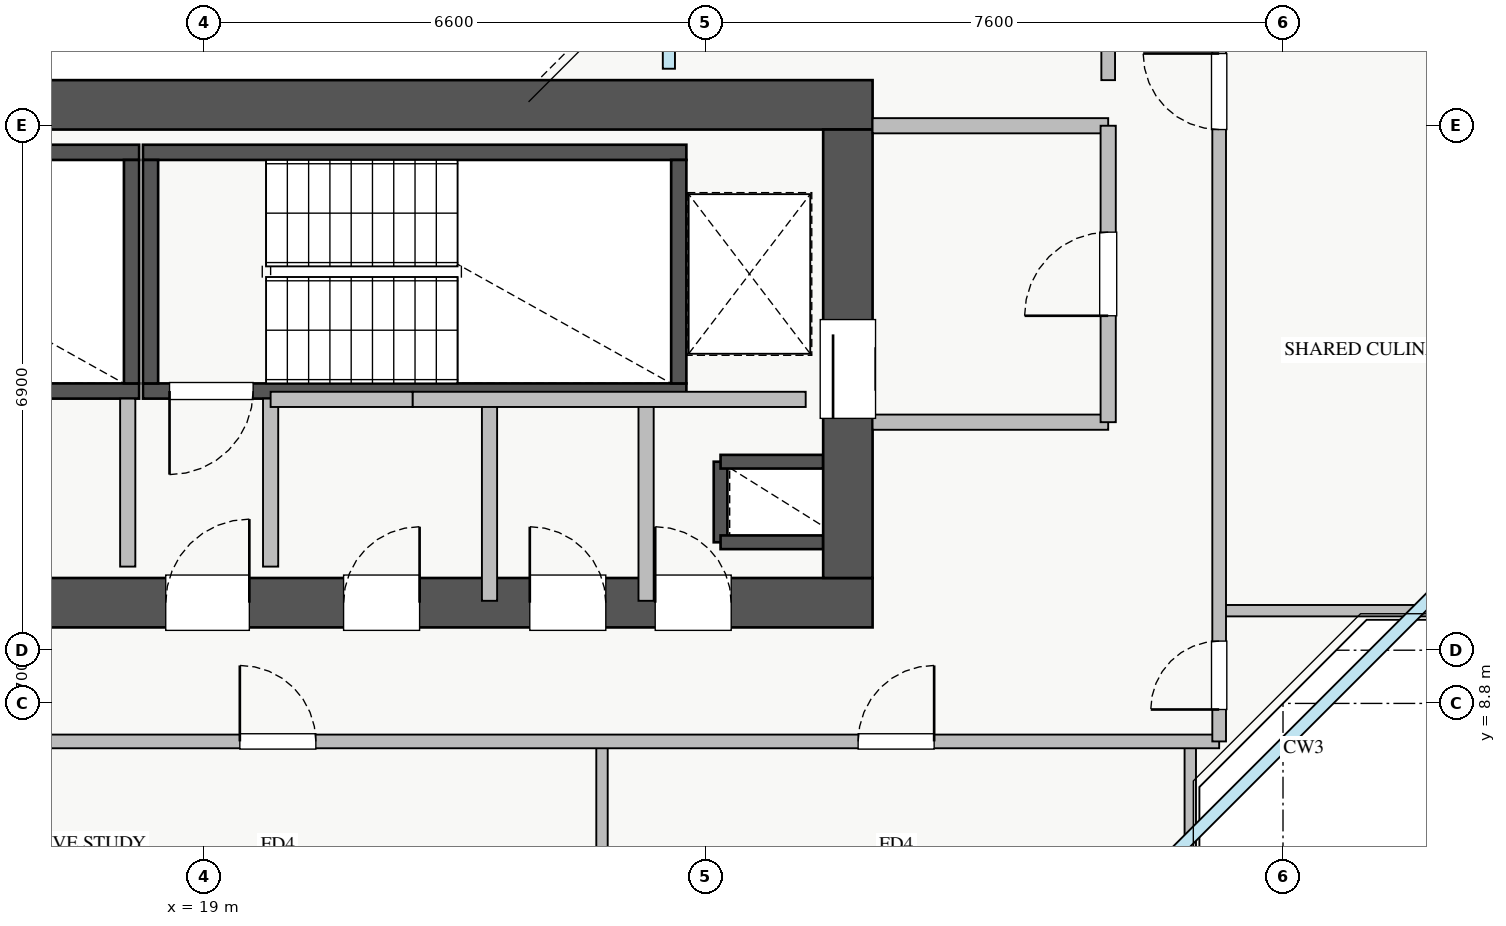
"""IFC4 building model, lengths in metres.
Left out: names, types, materials, properties, quantities, classifications, styles, units other than length and angle.
Written with IfcOpenShell. Run it as: python <this file> out.ifc"""

import sys

from ifc_helpers import new_model, si_unit, direction, frame, frame_2d, origin, place, context, subcontext, project, spatial, rectangle, extrude, source, transform, mapped, element, fill, save


model = new_model("IFC4")
c1 = context("Model", 3, precision=1e-05, world=origin(), true_north=direction((0.0, 1.0)))
c2 = subcontext(c1, "Body", "Model", "MODEL_VIEW")
j1 = project(units=[si_unit("LENGTHUNIT", "METRE"), si_unit("PLANEANGLEUNIT", "RADIAN")], contexts=[c1])
p1 = place(None, origin())
s1 = spatial("IfcSite", under=j1, at=p1, CompositionType="ELEMENT")
p2 = place(p1, origin())
s2 = spatial("IfcBuilding", under=s1, at=p2, CompositionType="ELEMENT")
p3 = place(p2, frame((0.0, 0.0, 150.25)))
s3 = spatial("IfcBuildingStorey", under=s2, at=p3, CompositionType="ELEMENT", Elevation=150.25)
p4 = place(p3, frame((25.8, 10.92, 0.0), z_axis=(0.0, 0.0, 1.0), x_axis=(0.0, 1.0, 0.0)))
e1 = element("IfcWall", 1, at=p4, inside=s3, PredefinedType="SHEAR", context=c2, shape_type="SweptSolid", body=[
    extrude(rectangle(XDim=1.06, YDim=0.18, at=frame_2d((0.53, 0.0))), origin(), (0.0, 0.0, 1.0), 3.07),
])
for number, where, z_axis, x_axis in (
    (2, (25.8, 11.98, 0.0), (0.0, 0.0, 1.0), (1.0, 0.0, 0.0)),
    (3, (25.8, 10.92, 0.0), (0.0, 0.0, 1.0), (1.0, 0.0, 0.0)),
):
    element("IfcWall", number, at=place(p3, frame(where, z_axis=z_axis, x_axis=x_axis)), inside=s3, PredefinedType="SHEAR", context=c2, shape_type="SweptSolid", body=[
        extrude(rectangle(XDim=1.35, YDim=0.18, at=frame_2d((0.675, 0.0))), origin(), (0.0, 0.0, 1.0), 3.07),
    ])
p5 = place(p3, frame((10.85, 12.91, 0.0), z_axis=(0.0, 0.0, 1.0), x_axis=(1.0, 0.0, 0.0)))
e4 = element("IfcWall", 4, at=p5, inside=s3, PredefinedType="SHEAR", context=c2, shape_type="SweptSolid", body=[
    extrude(rectangle(XDim=7.3, YDim=0.2, at=frame_2d((3.65, 0.0))), origin(), (0.0, 0.0, 1.0), 3.25),
])
p6 = place(p5, frame((0.35, 0.0, 0.0)))
e5 = element("IfcOpeningElement", 5, at=p6, cuts=e4, PredefinedType="OPENING", context=c2, shape_type="SweptSolid", body=[
    extrude(rectangle(XDim=1.1, YDim=2.05, at=frame_2d((0.55, 1.025))), frame((0.0, 0.11, 0.0), z_axis=(0.0, -1.0, 0.0), x_axis=(1.0, 0.0, 0.0)), (0.0, 0.0, 1.0), 0.22),
])
p7 = place(p3, frame((10.85, 16.05, 0.0), z_axis=(0.0, 0.0, 1.0), x_axis=(1.0, 0.0, 0.0)))
e6 = element("IfcWall", 6, at=p7, inside=s3, PredefinedType="SHEAR", context=c2, shape_type="SweptSolid", body=[
    extrude(rectangle(XDim=7.3, YDim=0.2, at=frame_2d((3.65, 0.0))), origin(), (0.0, 0.0, 1.0), 3.25),
])
p8 = place(p3, frame((18.05, 13.01, 0.0), z_axis=(0.0, 0.0, 1.0), x_axis=(0.0, 1.0, 0.0)))
e7 = element("IfcWall", 7, at=p8, inside=s3, PredefinedType="SHEAR", context=c2, shape_type="SweptSolid", body=[
    extrude(rectangle(XDim=2.94, YDim=0.2, at=frame_2d((1.47, 0.0))), origin(), (0.0, 0.0, 1.0), 3.25),
])
p9 = place(p3, frame((18.2, 12.91, 0.0), z_axis=(0.0, 0.0, 1.0), x_axis=(1.0, 0.0, 0.0)))
e8 = element("IfcWall", 8, at=p9, inside=s3, PredefinedType="SHEAR", context=c2, shape_type="SweptSolid", body=[
    extrude(rectangle(XDim=7.15, YDim=0.2, at=frame_2d((3.575, 0.0))), origin(), (0.0, 0.0, 1.0), 3.25),
])
p10 = place(p9, frame((0.35, 0.0, 0.0)))
e9 = element("IfcOpeningElement", 9, at=p10, cuts=e8, PredefinedType="OPENING", context=c2, shape_type="SweptSolid", body=[
    extrude(rectangle(XDim=1.1, YDim=2.05, at=frame_2d((0.55, 1.025))), frame((0.0, 0.11, 0.0), z_axis=(0.0, -1.0, 0.0), x_axis=(1.0, 0.0, 0.0)), (0.0, 0.0, 1.0), 0.22),
])
p11 = place(p3, frame((18.2, 16.05, 0.0), z_axis=(0.0, 0.0, 1.0), x_axis=(1.0, 0.0, 0.0)))
e10 = element("IfcWall", 10, at=p11, inside=s3, PredefinedType="SHEAR", context=c2, shape_type="SweptSolid", body=[
    extrude(rectangle(XDim=7.15, YDim=0.2, at=frame_2d((3.575, 0.0))), origin(), (0.0, 0.0, 1.0), 3.25),
])
for number, where, z_axis, x_axis in (
    (11, (18.3, 13.01, 0.0), (0.0, 0.0, 1.0), (0.0, 1.0, 0.0)),
    (12, (25.25, 13.01, 0.0), (0.0, 0.0, 1.0), (0.0, 1.0, 0.0)),
):
    element("IfcWall", number, at=place(p3, frame(where, z_axis=z_axis, x_axis=x_axis)), inside=s3, PredefinedType="SHEAR", context=c2, shape_type="SweptSolid", body=[
        extrude(rectangle(XDim=2.94, YDim=0.2, at=frame_2d((1.47, 0.0))), origin(), (0.0, 0.0, 1.0), 3.25),
    ])
p12 = place(p3, frame((10.2, 10.125, 0.0), z_axis=(0.0, 0.0, 1.0), x_axis=(1.0, 0.0, 0.0)))
e13 = element("IfcWall", 13, at=p12, inside=s3, PredefinedType="SHEAR", context=c2, shape_type="SweptSolid", body=[
    extrude(rectangle(XDim=17.6, YDim=0.65, at=frame_2d((8.8, 0.0))), origin(), (0.0, 0.0, 1.0), 3.25),
])
p13 = place(p12, frame((1.15, 0.0, 0.0)))
e14 = element("IfcOpeningElement", 14, at=p13, cuts=e13, PredefinedType="OPENING", context=c2, shape_type="SweptSolid", body=[
    extrude(rectangle(XDim=1.1, YDim=2.05, at=frame_2d((0.55, 1.025))), frame((0.0, 0.335, 0.0), z_axis=(0.0, -1.0, 0.0), x_axis=(1.0, 0.0, 0.0)), (0.0, 0.0, 1.0), 0.67),
])
p14 = place(p12, frame((8.3, 0.0, 0.0)))
e15 = element("IfcOpeningElement", 15, at=p14, cuts=e13, PredefinedType="OPENING", context=c2, shape_type="SweptSolid", body=[
    extrude(rectangle(XDim=1.1, YDim=2.05, at=frame_2d((0.55, 1.025))), frame((0.0, 0.335, 0.0), z_axis=(0.0, -1.0, 0.0), x_axis=(1.0, 0.0, 0.0)), (0.0, 0.0, 1.0), 0.67),
])
p15 = place(p12, frame((4.9, 0.0, 0.0)))
e16 = element("IfcOpeningElement", 16, at=p15, cuts=e13, PredefinedType="OPENING", context=c2, shape_type="SweptSolid", body=[
    extrude(rectangle(XDim=1.1, YDim=2.05, at=frame_2d((0.55, 1.025))), frame((0.0, 0.335, 0.0), z_axis=(0.0, -1.0, 0.0), x_axis=(1.0, 0.0, 0.0)), (0.0, 0.0, 1.0), 0.67),
])
p16 = place(p12, frame((14.74, 0.0, 0.0)))
e17 = element("IfcOpeningElement", 17, at=p16, cuts=e13, PredefinedType="OPENING", context=c2, shape_type="SweptSolid", body=[
    extrude(rectangle(XDim=1.0, YDim=2.05, at=frame_2d((0.5, 1.025))), frame((0.0, 0.335, 0.0), z_axis=(0.0, -1.0, 0.0), x_axis=(1.0, 0.0, 0.0)), (0.0, 0.0, 1.0), 0.67),
])
p17 = place(p12, frame((10.64, 0.0, 0.0)))
e18 = element("IfcOpeningElement", 18, at=p17, cuts=e13, PredefinedType="OPENING", context=c2, shape_type="SweptSolid", body=[
    extrude(rectangle(XDim=1.0, YDim=2.05, at=frame_2d((0.5, 1.025))), frame((0.0, 0.335, 0.0), z_axis=(0.0, -1.0, 0.0), x_axis=(1.0, 0.0, 0.0)), (0.0, 0.0, 1.0), 0.67),
])
p18 = place(p12, frame((13.09, 0.0, 0.0)))
e19 = element("IfcOpeningElement", 19, at=p18, cuts=e13, PredefinedType="OPENING", context=c2, shape_type="SweptSolid", body=[
    extrude(rectangle(XDim=1.0, YDim=2.05, at=frame_2d((0.5, 1.025))), frame((0.0, 0.335, 0.0), z_axis=(0.0, -1.0, 0.0), x_axis=(1.0, 0.0, 0.0)), (0.0, 0.0, 1.0), 0.67),
])
p19 = place(p3, frame((10.2, 16.675, 0.0), z_axis=(0.0, 0.0, 1.0), x_axis=(1.0, 0.0, 0.0)))
e20 = element("IfcWall", 20, at=p19, inside=s3, PredefinedType="SHEAR", context=c2, shape_type="SweptSolid", body=[
    extrude(rectangle(XDim=17.6, YDim=0.65, at=frame_2d((8.8, 0.0))), origin(), (0.0, 0.0, 1.0), 3.25),
])
p20 = place(p3, frame((27.475, 10.45, 0.0), z_axis=(0.0, 0.0, 1.0), x_axis=(0.0, 1.0, 0.0)))
e21 = element("IfcWall", 21, at=p20, inside=s3, PredefinedType="SHEAR", context=c2, shape_type="SweptSolid", body=[
    extrude(rectangle(XDim=5.9, YDim=0.65, at=frame_2d((2.95, 0.0))), origin(), (0.0, 0.0, 1.0), 3.25),
])
p21 = place(p20, frame((2.1, 0.0, 0.0)))
e22 = element("IfcOpeningElement", 22, at=p21, cuts=e21, PredefinedType="OPENING", context=c2, shape_type="SweptSolid", body=[
    extrude(rectangle(XDim=1.3, YDim=2.05, at=frame_2d((0.65, 1.025))), frame((0.0, 0.335, 0.0), z_axis=(0.0, -1.0, 0.0), x_axis=(1.0, 0.0, 0.0)), (0.0, 0.0, 1.0), 0.67),
])
for number, where, z_axis, x_axis in (
    (23, (27.8, 16.4, 0.0), (0.0, 0.0, 1.0), (1.0, 0.0, 0.0)),
    (24, (27.8, 12.5, 0.0), (0.0, 0.0, 1.0), (1.0, 0.0, 0.0)),
):
    element("IfcWall", number, at=place(p3, frame(where, z_axis=z_axis, x_axis=x_axis)), inside=s3, PredefinedType="PARTITIONING", context=c2, shape_type="SweptSolid", body=[
        extrude(rectangle(XDim=3.1, YDim=0.2, at=frame_2d((1.55, 0.0))), origin(), (0.0, 0.0, 1.0), 3.07),
    ])
p22 = place(p3, frame((30.9, 12.5, 0.0), z_axis=(0.0, 0.0, 1.0), x_axis=(0.0, 1.0, 0.0)))
e25 = element("IfcWall", 25, at=p22, inside=s3, PredefinedType="PARTITIONING", context=c2, shape_type="SweptSolid", body=[
    extrude(rectangle(XDim=3.9, YDim=0.2, at=frame_2d((1.95, 0.0))), origin(), (0.0, 0.0, 1.0), 3.07),
])
p23 = place(p22, frame((1.4, 0.0, 0.0)))
e26 = element("IfcOpeningElement", 26, at=p23, cuts=e25, PredefinedType="OPENING", context=c2, shape_type="SweptSolid", body=[
    extrude(rectangle(XDim=1.1, YDim=2.05, at=frame_2d((0.55, 1.025))), frame((0.0, 0.11, 0.0), z_axis=(0.0, -1.0, 0.0), x_axis=(1.0, 0.0, 0.0)), (0.0, 0.0, 1.0), 0.22),
])
for number, where, z_axis, x_axis in (
    (27, (18.0, 10.6, 0.0), (0.0, 0.0, 1.0), (0.0, 1.0, 0.0)),
    (28, (19.88, 10.6, 0.0), (0.0, 0.0, 1.0), (0.0, 1.0, 0.0)),
):
    element("IfcWall", number, at=place(p3, frame(where, z_axis=z_axis, x_axis=x_axis)), inside=s3, PredefinedType="PARTITIONING", context=c2, shape_type="SweptSolid", body=[
        extrude(rectangle(XDim=2.21, YDim=0.2, at=frame_2d((1.105, 0.0))), origin(), (0.0, 0.0, 1.0), 3.07),
    ])
p24 = place(p3, frame((24.82, 10.15, 0.0), z_axis=(0.0, 0.0, 1.0), x_axis=(0.0, 1.0, 0.0)))
e29 = element("IfcWall", 29, at=p24, inside=s3, PredefinedType="PARTITIONING", context=c2, shape_type="SweptSolid", body=[
    extrude(rectangle(XDim=2.65, YDim=0.2, at=frame_2d((1.325, 0.0))), origin(), (0.0, 0.0, 1.0), 3.07),
])
p25 = place(p3, frame((19.88, 12.8, 0.0), z_axis=(0.0, 0.0, 1.0), x_axis=(1.0, 0.0, 0.0)))
e30 = element("IfcWall", 30, at=p25, inside=s3, PredefinedType="PARTITIONING", context=c2, shape_type="SweptSolid", body=[
    extrude(rectangle(XDim=1.87, YDim=0.2, at=frame_2d((0.935, 0.0))), origin(), (0.0, 0.0, 1.0), 3.07),
])
p26 = place(p3, frame((22.76, 10.15, 0.0), z_axis=(0.0, 0.0, 1.0), x_axis=(0.0, 1.0, 0.0)))
e31 = element("IfcWall", 31, at=p26, inside=s3, PredefinedType="PARTITIONING", context=c2, shape_type="SweptSolid", body=[
    extrude(rectangle(XDim=2.65, YDim=0.2, at=frame_2d((1.325, 0.0))), origin(), (0.0, 0.0, 1.0), 3.07),
])
p27 = place(p3, frame((21.75, 12.8, 0.0), z_axis=(0.0, 0.0, 1.0), x_axis=(1.0, 0.0, 0.0)))
e32 = element("IfcWall", 32, at=p27, inside=s3, PredefinedType="PARTITIONING", context=c2, shape_type="SweptSolid", body=[
    extrude(rectangle(XDim=5.17, YDim=0.2, at=frame_2d((2.585, 0.0))), origin(), (0.0, 0.0, 1.0), 3.07),
])
for number, where, z_axis, x_axis in (
    (33, (24.24, 5.35, 0.0), (0.0, 0.0, 1.0), (0.0, 1.0, 0.0)),
    (34, (31.98, 5.35, 0.0), (0.0, 0.0, 1.0), (0.0, 1.0, 0.0)),
):
    element("IfcWall", number, at=place(p3, frame(where, z_axis=z_axis, x_axis=x_axis)), inside=s3, PredefinedType="PARTITIONING", context=c2, shape_type="SweptSolid", body=[
        extrude(rectangle(XDim=2.95, YDim=0.15, at=frame_2d((1.475, 0.0))), origin(), (0.0, 0.0, 1.0), 3.07),
    ])
p28 = place(p3, frame((8.75, 8.3, 0.0), z_axis=(0.0, 0.0, 1.0), x_axis=(1.0, 0.0, 0.0)))
e35 = element("IfcWall", 35, at=p28, inside=s3, PredefinedType="PARTITIONING", context=c2, shape_type="SweptSolid", body=[
    extrude(rectangle(XDim=23.61, YDim=0.18, at=frame_2d((11.805, 0.0))), origin(), (0.0, 0.0, 1.0), 3.07),
])
p29 = place(p28, frame((2.98, 0.0, 0.0)))
e36 = element("IfcOpeningElement", 36, at=p29, cuts=e35, PredefinedType="OPENING", context=c2, shape_type="SweptSolid", body=[
    extrude(rectangle(XDim=1.0, YDim=2.05, at=frame_2d((0.5, 1.025))), frame((0.0, 0.1, 0.0), z_axis=(0.0, -1.0, 0.0), x_axis=(1.0, 0.0, 0.0)), (0.0, 0.0, 1.0), 0.2),
])
p30 = place(p28, frame((10.725, 0.0, 0.0)))
e37 = element("IfcOpeningElement", 37, at=p30, cuts=e35, PredefinedType="OPENING", context=c2, shape_type="SweptSolid", body=[
    extrude(rectangle(XDim=1.0, YDim=2.05, at=frame_2d((0.5, 1.025))), frame((0.0, 0.1, 0.0), z_axis=(0.0, -1.0, 0.0), x_axis=(1.0, 0.0, 0.0)), (0.0, 0.0, 1.0), 0.2),
])
p31 = place(p28, frame((18.86, 0.0, 0.0)))
e38 = element("IfcOpeningElement", 38, at=p31, cuts=e35, PredefinedType="OPENING", context=c2, shape_type="SweptSolid", body=[
    extrude(rectangle(XDim=1.0, YDim=2.05, at=frame_2d((0.5, 1.025))), frame((0.0, 0.1, 0.0), z_axis=(0.0, -1.0, 0.0), x_axis=(1.0, 0.0, 0.0)), (0.0, 0.0, 1.0), 0.2),
])
p32 = place(p3, frame((32.36, 10.02, 0.0), z_axis=(0.0, 0.0, 1.0), x_axis=(1.0, 0.0, 0.0)))
e39 = element("IfcWall", 39, at=p32, inside=s3, PredefinedType="PARTITIONING", context=c2, shape_type="SweptSolid", body=[
    extrude(rectangle(XDim=4.29, YDim=0.15, at=frame_2d((2.145, 0.0))), origin(), (0.0, 0.0, 1.0), 3.07),
])
p33 = place(p3, frame((32.36, 8.3, 0.0), z_axis=(0.0, 0.0, 1.0), x_axis=(0.0, 1.0, 0.0)))
e40 = element("IfcWall", 40, at=p33, inside=s3, PredefinedType="PARTITIONING", context=c2, shape_type="SweptSolid", body=[
    extrude(rectangle(XDim=29.4, YDim=0.18, at=frame_2d((14.7, 0.0))), origin(), (0.0, 0.0, 1.0), 3.07),
])
p34 = place(p33, frame((28.08, 0.0, 0.0)))
e41 = element("IfcOpeningElement", 41, at=p34, cuts=e40, PredefinedType="OPENING", context=c2, shape_type="SweptSolid", body=[
    extrude(rectangle(XDim=0.9, YDim=2.05, at=frame_2d((0.45, 1.025))), frame((0.0, 0.1, 0.0), z_axis=(0.0, -1.0, 0.0), x_axis=(1.0, 0.0, 0.0)), (0.0, 0.0, 1.0), 0.2),
])
p35 = place(p33, frame((0.42, 0.0, 0.0)))
e42 = element("IfcOpeningElement", 42, at=p35, cuts=e40, PredefinedType="OPENING", context=c2, shape_type="SweptSolid", body=[
    extrude(rectangle(XDim=0.9, YDim=2.05, at=frame_2d((0.45, 1.025))), frame((0.0, 0.1, 0.0), z_axis=(0.0, -1.0, 0.0), x_axis=(1.0, 0.0, 0.0)), (0.0, 0.0, 1.0), 0.2),
])
p36 = place(p33, frame((8.05, 0.0, 0.0)))
e43 = element("IfcOpeningElement", 43, at=p36, cuts=e40, PredefinedType="OPENING", context=c2, shape_type="SweptSolid", body=[
    extrude(rectangle(XDim=1.0, YDim=2.05, at=frame_2d((0.5, 1.025))), frame((0.0, 0.1, 0.0), z_axis=(0.0, -1.0, 0.0), x_axis=(1.0, 0.0, 0.0)), (0.0, 0.0, 1.0), 0.2),
])
p37 = place(p33, frame((18.01, 0.0, 0.0)))
e44 = element("IfcOpeningElement", 44, at=p37, cuts=e40, PredefinedType="OPENING", context=c2, shape_type="SweptSolid", body=[
    extrude(rectangle(XDim=1.0, YDim=2.05, at=frame_2d((0.5, 1.025))), frame((0.0, 0.1, 0.0), z_axis=(0.0, -1.0, 0.0), x_axis=(1.0, 0.0, 0.0)), (0.0, 0.0, 1.0), 0.2),
])
p38 = place(p3, frame((30.9, 17.0, 0.0), z_axis=(0.0, 0.0, 1.0), x_axis=(0.0, 1.0, 0.0)))
e45 = element("IfcWall", 45, at=p38, inside=s3, PredefinedType="PARTITIONING", context=c2, shape_type="SweptSolid", body=[
    extrude(rectangle(XDim=12.0, YDim=0.18, at=frame_2d((6.0, 0.0))), origin(), (0.0, 0.0, 1.0), 3.07),
])
p39 = place(p38, frame((2.36, 0.0, 0.0)))
e46 = element("IfcOpeningElement", 46, at=p39, cuts=e45, PredefinedType="OPENING", context=c2, shape_type="SweptSolid", body=[
    extrude(rectangle(XDim=1.0, YDim=2.05, at=frame_2d((0.5, 1.025))), frame((0.0, 0.1, 0.0), z_axis=(0.0, -1.0, 0.0), x_axis=(1.0, 0.0, 0.0)), (0.0, 0.0, 1.0), 0.2),
])
m1 = source(origin(), c2, "Body", "SweptSolid", [
    extrude(rectangle(XDim=1.3, YDim=2.05, at=frame_2d((0.65, 1.025))), frame((0.0, 0.025, 0.0), z_axis=(0.0, -1.0, 0.0), x_axis=(1.0, 0.0, 0.0)), (0.0, 0.0, 1.0), 0.05),
])
p40 = place(p21, origin())
e47 = element("IfcDoor", 47, at=p40, inside=s3, OperationType="SLIDING_TO_RIGHT", PredefinedType="DOOR", context=c2, shape_type="MappedRepresentation", body=[
    mapped(m1, transform((0.0, 0.0, 0.0), x_axis=(1.0, 0.0, 0.0), y_axis=(0.0, 1.0, 0.0), z_axis=(0.0, 0.0, 1.0), scale=1.0)),
])
fill(e22, e47)
m2 = source(origin(), c2, "Body", "SweptSolid", [
    extrude(rectangle(XDim=1.1, YDim=2.05, at=frame_2d((0.55, 1.025))), frame((0.0, 0.025, 0.0), z_axis=(0.0, -1.0, 0.0), x_axis=(1.0, 0.0, 0.0)), (0.0, 0.0, 1.0), 0.05),
])
p41 = place(p14, origin())
e48 = element("IfcDoor", 48, at=p41, inside=s3, OperationType="SINGLE_SWING_RIGHT", PredefinedType="DOOR", context=c2, shape_type="MappedRepresentation", body=[
    mapped(m2, transform((0.0, 0.0, 0.0), x_axis=(1.0, 0.0, 0.0), y_axis=(0.0, 1.0, 0.0), z_axis=(0.0, 0.0, 1.0), scale=1.0)),
])
fill(e15, e48)
p42 = place(p10, frame((1.1, 0.0, 0.0), z_axis=(0.0, 0.0, 1.0), x_axis=(-1.0, 0.0, 0.0)))
e49 = element("IfcDoor", 49, at=p42, inside=s3, OperationType="SINGLE_SWING_LEFT", PredefinedType="DOOR", context=c2, shape_type="MappedRepresentation", body=[
    mapped(m2, transform((0.0, 0.0, 0.0), x_axis=(1.0, 0.0, 0.0), y_axis=(0.0, 1.0, 0.0), z_axis=(0.0, 0.0, 1.0), scale=1.0)),
])
fill(e9, e49)
m3 = source(origin(), c2, "Body", "SweptSolid", [
    extrude(rectangle(XDim=1.0, YDim=2.05, at=frame_2d((0.5, 1.025))), frame((0.0, 0.025, 0.0), z_axis=(0.0, -1.0, 0.0), x_axis=(1.0, 0.0, 0.0)), (0.0, 0.0, 1.0), 0.05),
])
p43 = place(p16, origin())
e50 = element("IfcDoor", 50, at=p43, inside=s3, OperationType="SINGLE_SWING_LEFT", PredefinedType="DOOR", context=c2, shape_type="MappedRepresentation", body=[
    mapped(m3, transform((0.0, 0.0, 0.0), x_axis=(1.0, 0.0, 0.0), y_axis=(0.0, 1.0, 0.0), z_axis=(0.0, 0.0, 1.0), scale=1.0)),
])
fill(e17, e50)
p44 = place(p17, origin())
e51 = element("IfcDoor", 51, at=p44, inside=s3, OperationType="SINGLE_SWING_RIGHT", PredefinedType="DOOR", context=c2, shape_type="MappedRepresentation", body=[
    mapped(m3, transform((0.0, 0.0, 0.0), x_axis=(1.0, 0.0, 0.0), y_axis=(0.0, 1.0, 0.0), z_axis=(0.0, 0.0, 1.0), scale=1.0)),
])
fill(e18, e51)
p45 = place(p18, origin())
e52 = element("IfcDoor", 52, at=p45, inside=s3, OperationType="SINGLE_SWING_LEFT", PredefinedType="DOOR", context=c2, shape_type="MappedRepresentation", body=[
    mapped(m3, transform((0.0, 0.0, 0.0), x_axis=(1.0, 0.0, 0.0), y_axis=(0.0, 1.0, 0.0), z_axis=(0.0, 0.0, 1.0), scale=1.0)),
])
fill(e19, e52)
p46 = place(p23, origin())
e53 = element("IfcDoor", 53, at=p46, inside=s3, OperationType="SINGLE_SWING_LEFT", PredefinedType="DOOR", context=c2, shape_type="MappedRepresentation", body=[
    mapped(m2, transform((0.0, 0.0, 0.0), x_axis=(1.0, 0.0, 0.0), y_axis=(0.0, 1.0, 0.0), z_axis=(0.0, 0.0, 1.0), scale=1.0)),
])
fill(e26, e53)
p47 = place(p30, origin())
e54 = element("IfcDoor", 54, at=p47, inside=s3, OperationType="SINGLE_SWING_LEFT", PredefinedType="DOOR", context=c2, shape_type="MappedRepresentation", body=[
    mapped(m3, transform((0.0, 0.0, 0.0), x_axis=(1.0, 0.0, 0.0), y_axis=(0.0, 1.0, 0.0), z_axis=(0.0, 0.0, 1.0), scale=1.0)),
])
fill(e37, e54)
p48 = place(p31, origin())
e55 = element("IfcDoor", 55, at=p48, inside=s3, OperationType="SINGLE_SWING_RIGHT", PredefinedType="DOOR", context=c2, shape_type="MappedRepresentation", body=[
    mapped(m3, transform((0.0, 0.0, 0.0), x_axis=(1.0, 0.0, 0.0), y_axis=(0.0, 1.0, 0.0), z_axis=(0.0, 0.0, 1.0), scale=1.0)),
])
fill(e38, e55)
m4 = source(origin(), c2, "Body", "SweptSolid", [
    extrude(rectangle(XDim=0.9, YDim=2.05, at=frame_2d((0.45, 1.025))), frame((0.0, 0.025, 0.0), z_axis=(0.0, -1.0, 0.0), x_axis=(1.0, 0.0, 0.0)), (0.0, 0.0, 1.0), 0.05),
])
p49 = place(p35, origin())
e56 = element("IfcDoor", 56, at=p49, inside=s3, OperationType="SINGLE_SWING_LEFT", PredefinedType="DOOR", context=c2, shape_type="MappedRepresentation", body=[
    mapped(m4, transform((0.0, 0.0, 0.0), x_axis=(1.0, 0.0, 0.0), y_axis=(0.0, 1.0, 0.0), z_axis=(0.0, 0.0, 1.0), scale=1.0)),
])
fill(e42, e56)
p50 = place(p36, origin())
e57 = element("IfcDoor", 57, at=p50, inside=s3, OperationType="SINGLE_SWING_RIGHT", PredefinedType="DOOR", context=c2, shape_type="MappedRepresentation", body=[
    mapped(m3, transform((0.0, 0.0, 0.0), x_axis=(1.0, 0.0, 0.0), y_axis=(0.0, 1.0, 0.0), z_axis=(0.0, 0.0, 1.0), scale=1.0)),
])
fill(e43, e57)
save(model, sys.argv[1])
